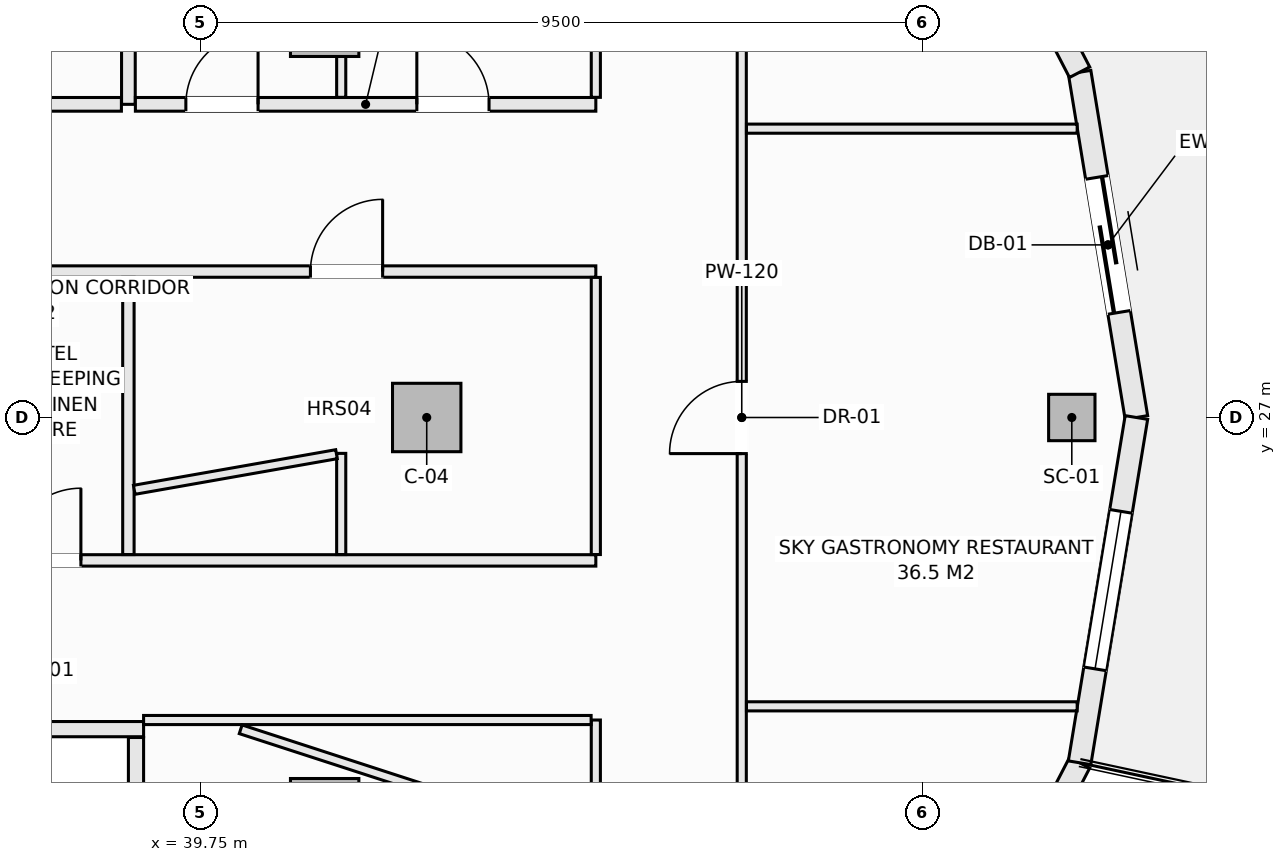
"""IFC4 building model, lengths in metres.
Left out: names, types, materials, properties, quantities, classifications, styles, units other than length and angle.
Written with IfcOpenShell. Run it as: python <this file> out.ifc"""

import sys

from ifc_helpers import new_model, si_unit, direction, frame, frame_2d, origin, origin_2d, place, context, subcontext, project, spatial, rectangle, hollow_rectangle, extrude, element, fill, save


model = new_model("IFC4")
c1 = context("Model", 3, precision=1e-05, world=origin(), true_north=direction((0.0, 1.0)))
c2 = subcontext(c1, "Body", "Model", "MODEL_VIEW")
j1 = project(units=[si_unit("LENGTHUNIT", "METRE"), si_unit("PLANEANGLEUNIT", "RADIAN")], contexts=[c1])
p1 = place(None, origin())
s1 = spatial("IfcSite", under=j1, at=p1, CompositionType="ELEMENT")
p2 = place(p1, origin())
s2 = spatial("IfcBuilding", under=s1, at=p2, CompositionType="ELEMENT")
p3 = place(p2, frame((0.0, 0.0, 183.5)))
s3 = spatial("IfcBuildingStorey", under=s2, at=p3, CompositionType="ELEMENT", Elevation=183.5)
p4 = place(p3, frame((51.212, 27.0, -0.27), z_axis=(0.0, 0.0, 1.0), x_axis=(1.0, 0.0, 0.0)))
e1 = element("IfcColumn", 1, at=p4, inside=s3, PredefinedType="COLUMN", context=c2, shape_type="SweptSolid", body=[
    extrude(hollow_rectangle(XDim=0.61, YDim=0.61, WallThickness=0.025, at=origin_2d()), origin(), (0.0, 0.0, 1.0), 3.35),
])
for number, where, z_axis, x_axis in (
    (2, (42.725, 27.0, -0.27), (0.0, 0.0, 1.0), (1.0, 0.0, 0.0)),
    (3, (41.382, 32.199, -0.27), (0.0, 0.0, 1.0), (1.0, 0.0, 0.0)),
    (4, (41.382, 21.801, -0.27), (0.0, 0.0, 1.0), (1.0, 0.0, 0.0)),
):
    element("IfcColumn", number, at=place(p3, frame(where, z_axis=z_axis, x_axis=x_axis)), inside=s3, PredefinedType="COLUMN", context=c2, shape_type="SweptSolid", body=[
        extrude(rectangle(XDim=0.9, YDim=0.9, at=origin_2d()), origin(), (0.0, 0.0, 1.0), 3.35),
    ])
p5 = place(p3, frame((51.315, 31.542, 0.0), z_axis=(0.0, 0.0, 1.0), x_axis=(0.162394765401, -0.986725868806, 0.0)))
e5 = element("IfcWall", 5, at=p5, inside=s3, PredefinedType="SOLIDWALL", context=c2, shape_type="SweptSolid", body=[
    extrude(rectangle(XDim=4.603, YDim=0.3, at=frame_2d((2.302, 0.0))), origin(), (0.0, 0.0, 1.0), 2.603),
])
p6 = place(p5, frame((1.402, 0.0, 0.0)))
e6 = element("IfcOpeningElement", 6, at=p6, cuts=e5, PredefinedType="OPENING", context=c2, shape_type="SweptSolid", body=[
    extrude(rectangle(XDim=1.8, YDim=2.25, at=frame_2d((0.9, 1.125))), frame((0.0, 0.16, 0.0), z_axis=(0.0, -1.0, 0.0), x_axis=(1.0, 0.0, 0.0)), (0.0, 0.0, 1.0), 0.32),
])
p7 = place(p3, frame((49.123, 35.775, 0.0), z_axis=(0.0, 0.0, 1.0), x_axis=(0.459810251451, -0.888017191647, 0.0)))
e7 = element("IfcWall", 7, at=p7, inside=s3, PredefinedType="SOLIDWALL", context=c2, shape_type="SweptSolid", body=[
    extrude(rectangle(XDim=4.766, YDim=0.3, at=frame_2d((2.383, 0.0))), origin(), (0.0, 0.0, 1.0), 2.603),
])
p8 = place(p7, frame((1.333, 0.0, 0.74)))
e8 = element("IfcOpeningElement", 8, at=p8, cuts=e7, PredefinedType="OPENING", context=c2, shape_type="SweptSolid", body=[
    extrude(rectangle(XDim=2.1, YDim=1.7, at=frame_2d((1.05, 0.85))), frame((0.0, 0.16, 0.0), z_axis=(0.0, -1.0, 0.0), x_axis=(1.0, 0.0, 0.0)), (0.0, 0.0, 1.0), 0.32),
])
p9 = place(p3, frame((49.123, 18.225, 0.0), z_axis=(0.0, 0.0, 1.0), x_axis=(0.459810251451, 0.888017191647, 0.0)))
e9 = element("IfcWall", 9, at=p9, inside=s3, PredefinedType="SOLIDWALL", context=c2, shape_type="SweptSolid", body=[
    extrude(rectangle(XDim=4.766, YDim=0.3, at=frame_2d((2.383, 0.0))), origin(), (0.0, 0.0, 1.0), 2.603),
])
p10 = place(p9, frame((1.333, 0.0, 0.74)))
e10 = element("IfcOpeningElement", 10, at=p10, cuts=e9, PredefinedType="OPENING", context=c2, shape_type="SweptSolid", body=[
    extrude(rectangle(XDim=2.1, YDim=1.7, at=frame_2d((1.05, 0.85))), frame((0.0, 0.16, 0.0), z_axis=(0.0, -1.0, 0.0), x_axis=(1.0, 0.0, 0.0)), (0.0, 0.0, 1.0), 0.32),
])
p11 = place(p3, frame((51.315, 22.458, 0.0), z_axis=(0.0, 0.0, 1.0), x_axis=(0.162394765401, 0.986725868806, 0.0)))
e11 = element("IfcWall", 11, at=p11, inside=s3, PredefinedType="SOLIDWALL", context=c2, shape_type="SweptSolid", body=[
    extrude(rectangle(XDim=4.603, YDim=0.3, at=frame_2d((2.302, 0.0))), origin(), (0.0, 0.0, 1.0), 2.603),
])
p12 = place(p11, frame((1.252, 0.0, 0.74)))
e12 = element("IfcOpeningElement", 12, at=p12, cuts=e11, PredefinedType="OPENING", context=c2, shape_type="SweptSolid", body=[
    extrude(rectangle(XDim=2.1, YDim=1.7, at=frame_2d((1.05, 0.85))), frame((0.0, 0.16, 0.0), z_axis=(0.0, -1.0, 0.0), x_axis=(1.0, 0.0, 0.0)), (0.0, 0.0, 1.0), 0.32),
])
p13 = place(p3, frame((36.75, 22.9, 0.0), z_axis=(0.0, 0.0, 1.0), x_axis=(1.0, 0.0, 0.0)))
e13 = element("IfcWall", 13, at=p13, inside=s3, PredefinedType="SOLIDWALL", context=c2, shape_type="SweptSolid", body=[
    extrude(rectangle(XDim=2.25, YDim=0.2, at=frame_2d((1.125, 0.0))), origin(), (0.0, 0.0, 1.0), 3.08),
])
p14 = place(p3, frame((38.9, 20.36, 0.0), z_axis=(0.0, 0.0, 1.0), x_axis=(0.0, 1.0, 0.0)))
e14 = element("IfcWall", 14, at=p14, inside=s3, PredefinedType="SOLIDWALL", context=c2, shape_type="SweptSolid", body=[
    extrude(rectangle(XDim=2.43, YDim=0.2, at=frame_2d((1.215, 0.0))), origin(), (0.0, 0.0, 1.0), 3.08),
])
p15 = place(p3, frame((29.78, 25.12, 0.0), z_axis=(0.0, 0.0, 1.0), x_axis=(1.0, 0.0, 0.0)))
e15 = element("IfcWall", 15, at=p15, inside=s3, PredefinedType="PARTITIONING", context=c2, shape_type="SweptSolid", body=[
    extrude(rectangle(XDim=15.17, YDim=0.15, at=frame_2d((7.585, 0.0))), origin(), (0.0, 0.0, 1.0), 3.08),
])
p16 = place(p15, frame((3.14, 0.0, 0.0)))
e16 = element("IfcOpeningElement", 16, at=p16, cuts=e15, PredefinedType="OPENING", context=c2, shape_type="SweptSolid", body=[
    extrude(rectangle(XDim=0.95, YDim=2.1, at=frame_2d((0.475, 1.05))), frame((0.0, 0.085, 0.0), z_axis=(0.0, -1.0, 0.0), x_axis=(1.0, 0.0, 0.0)), (0.0, 0.0, 1.0), 0.17),
])
p17 = place(p15, frame((7.445, 0.0, 0.0)))
e17 = element("IfcOpeningElement", 17, at=p17, cuts=e15, PredefinedType="OPENING", context=c2, shape_type="SweptSolid", body=[
    extrude(rectangle(XDim=0.95, YDim=2.1, at=frame_2d((0.475, 1.05))), frame((0.0, 0.085, 0.0), z_axis=(0.0, -1.0, 0.0), x_axis=(1.0, 0.0, 0.0)), (0.0, 0.0, 1.0), 0.17),
])
p18 = place(p3, frame((30.077, 28.92, 0.0), z_axis=(0.0, 0.0, 1.0), x_axis=(1.0, 0.0, 0.0)))
e18 = element("IfcWall", 18, at=p18, inside=s3, PredefinedType="PARTITIONING", context=c2, shape_type="SweptSolid", body=[
    extrude(rectangle(XDim=14.873, YDim=0.15, at=frame_2d((7.437, 0.0))), origin(), (0.0, 0.0, 1.0), 3.08),
])
p19 = place(p18, frame((11.118, 0.0, 0.0)))
e19 = element("IfcOpeningElement", 19, at=p19, cuts=e18, PredefinedType="OPENING", context=c2, shape_type="SweptSolid", body=[
    extrude(rectangle(XDim=0.95, YDim=2.1, at=frame_2d((0.475, 1.05))), frame((0.0, 0.085, 0.0), z_axis=(0.0, -1.0, 0.0), x_axis=(1.0, 0.0, 0.0)), (0.0, 0.0, 1.0), 0.17),
])
p20 = place(p3, frame((38.8, 25.197, 0.0), z_axis=(0.0, 0.0, 1.0), x_axis=(0.0, 1.0, 0.0)))
e20 = element("IfcWall", 20, at=p20, inside=s3, PredefinedType="PARTITIONING", context=c2, shape_type="SweptSolid", body=[
    extrude(rectangle(XDim=3.646, YDim=0.15, at=frame_2d((1.823, 0.0))), origin(), (0.0, 0.0, 1.0), 3.08),
])
p21 = place(p3, frame((38.8, 31.12, 0.0), z_axis=(0.0, 0.0, 1.0), x_axis=(0.0, 1.0, 0.0)))
e21 = element("IfcWall", 21, at=p21, inside=s3, PredefinedType="SOLIDWALL", context=c2, shape_type="SweptSolid", body=[
    extrude(rectangle(XDim=2.63, YDim=0.18, at=frame_2d((1.315, 0.0))), origin(), (0.0, 0.0, 1.0), 3.08),
])
p22 = place(p3, frame((30.077, 31.12, 0.0), z_axis=(0.0, 0.0, 1.0), x_axis=(1.0, 0.0, 0.0)))
e22 = element("IfcWall", 22, at=p22, inside=s3, PredefinedType="SOLIDWALL", context=c2, shape_type="SweptSolid", body=[
    extrude(rectangle(XDim=8.631, YDim=0.18, at=frame_2d((4.315, 0.0))), origin(), (0.0, 0.0, 1.0), 3.08),
])
p23 = place(p22, frame((2.592, 0.0, 0.0)))
e23 = element("IfcOpeningElement", 23, at=p23, cuts=e22, PredefinedType="OPENING", context=c2, shape_type="SweptSolid", body=[
    extrude(rectangle(XDim=0.95, YDim=2.1, at=frame_2d((0.475, 1.05))), frame((0.0, 0.1, 0.0), z_axis=(0.0, -1.0, 0.0), x_axis=(1.0, 0.0, 0.0)), (0.0, 0.0, 1.0), 0.2),
])
p24 = place(p22, frame((6.497, 0.0, 0.0)))
e24 = element("IfcOpeningElement", 24, at=p24, cuts=e22, PredefinedType="OPENING", context=c2, shape_type="SweptSolid", body=[
    extrude(rectangle(XDim=0.95, YDim=2.1, at=frame_2d((0.475, 1.05))), frame((0.0, 0.1, 0.0), z_axis=(0.0, -1.0, 0.0), x_axis=(1.0, 0.0, 0.0)), (0.0, 0.0, 1.0), 0.2),
])
p25 = place(p3, frame((38.892, 31.12, 0.0), z_axis=(0.0, 0.0, 1.0), x_axis=(1.0, 0.0, 0.0)))
e25 = element("IfcWall", 25, at=p25, inside=s3, PredefinedType="SOLIDWALL", context=c2, shape_type="SweptSolid", body=[
    extrude(rectangle(XDim=6.058, YDim=0.18, at=frame_2d((3.029, 0.0))), origin(), (0.0, 0.0, 1.0), 3.08),
])
p26 = place(p25, frame((3.703, 0.0, 0.0)))
e26 = element("IfcOpeningElement", 26, at=p26, cuts=e25, PredefinedType="OPENING", context=c2, shape_type="SweptSolid", body=[
    extrude(rectangle(XDim=0.95, YDim=2.1, at=frame_2d((0.475, 1.05))), frame((0.0, 0.1, 0.0), z_axis=(0.0, -1.0, 0.0), x_axis=(1.0, 0.0, 0.0)), (0.0, 0.0, 1.0), 0.2),
])
p27 = place(p25, frame((0.664, 0.0, 0.0)))
e27 = element("IfcOpeningElement", 27, at=p27, cuts=e25, PredefinedType="OPENING", context=c2, shape_type="SweptSolid", body=[
    extrude(rectangle(XDim=0.95, YDim=2.1, at=frame_2d((0.475, 1.05))), frame((0.0, 0.1, 0.0), z_axis=(0.0, -1.0, 0.0), x_axis=(1.0, 0.0, 0.0)), (0.0, 0.0, 1.0), 0.2),
])
p28 = place(p3, frame((44.95, 20.192, 0.0), z_axis=(0.0, 0.0, 1.0), x_axis=(0.0, 1.0, 0.0)))
e28 = element("IfcWall", 28, at=p28, inside=s3, PredefinedType="PARTITIONING", context=c2, shape_type="SweptSolid", body=[
    extrude(rectangle(XDim=2.828, YDim=0.12, at=frame_2d((1.414, 0.0))), origin(), (0.0, 0.0, 1.0), 3.08),
])
p29 = place(p3, frame((44.95, 25.197, 0.0), z_axis=(0.0, 0.0, 1.0), x_axis=(0.0, 1.0, 0.0)))
e29 = element("IfcWall", 29, at=p29, inside=s3, PredefinedType="PARTITIONING", context=c2, shape_type="SweptSolid", body=[
    extrude(rectangle(XDim=3.646, YDim=0.12, at=frame_2d((1.823, 0.0))), origin(), (0.0, 0.0, 1.0), 3.08),
])
p30 = place(p3, frame((44.95, 31.212, 0.0), z_axis=(0.0, 0.0, 1.0), x_axis=(0.0, 1.0, 0.0)))
e30 = element("IfcWall", 30, at=p30, inside=s3, PredefinedType="PARTITIONING", context=c2, shape_type="SweptSolid", body=[
    extrude(rectangle(XDim=2.596, YDim=0.12, at=frame_2d((1.298, 0.0))), origin(), (0.0, 0.0, 1.0), 3.08),
])
p31 = place(p3, frame((46.87, 21.659, 0.0), z_axis=(0.0, 0.0, 1.0), x_axis=(0.0, 1.0, 0.0)))
e31 = element("IfcWall", 31, at=p31, inside=s3, PredefinedType="PARTITIONING", context=c2, shape_type="SweptSolid", body=[
    extrude(rectangle(XDim=10.682, YDim=0.12, at=frame_2d((5.341, 0.0))), origin(), (0.0, 0.0, 1.0), 3.08),
])
p32 = place(p31, frame((4.866, 0.0, 0.0)))
e32 = element("IfcOpeningElement", 32, at=p32, cuts=e31, PredefinedType="OPENING", context=c2, shape_type="SweptSolid", body=[
    extrude(rectangle(XDim=0.95, YDim=2.1, at=frame_2d((0.475, 1.05))), frame((0.0, 0.07, 0.0), z_axis=(0.0, -1.0, 0.0), x_axis=(1.0, 0.0, 0.0)), (0.0, 0.0, 1.0), 0.14),
])
p33 = place(p3, frame((39.0, 23.02, 0.0), z_axis=(0.0, 0.0, 1.0), x_axis=(1.0, 0.0, 0.0)))
e33 = element("IfcWall", 33, at=p33, inside=s3, PredefinedType="PARTITIONING", context=c2, shape_type="SweptSolid", body=[
    extrude(rectangle(XDim=5.888, YDim=0.12, at=frame_2d((2.944, 0.0))), origin(), (0.0, 0.0, 1.0), 3.08),
])
p34 = place(p3, frame((40.278, 22.898, 0.0), z_axis=(0.0, 0.0, 1.0), x_axis=(0.951068113263, -0.3089813003, 0.0)))
e34 = element("IfcWall", 34, at=p34, inside=s3, PredefinedType="PARTITIONING", context=c2, shape_type="SweptSolid", body=[
    extrude(rectangle(XDim=4.848, YDim=0.12, at=frame_2d((2.424, 0.0))), origin(), (0.0, 0.0, 1.0), 3.08),
])
p35 = place(p3, frame((46.932, 23.2, 0.0), z_axis=(0.0, 0.0, 1.0), x_axis=(1.0, 0.0, 0.0)))
e35 = element("IfcWall", 35, at=p35, inside=s3, PredefinedType="PARTITIONING", context=c2, shape_type="SweptSolid", body=[
    extrude(rectangle(XDim=4.351, YDim=0.12, at=frame_2d((2.176, 0.0))), origin(), (0.0, 0.0, 1.0), 2.762),
])
p36 = place(p3, frame((46.932, 30.8, 0.0), z_axis=(0.0, 0.0, 1.0), x_axis=(1.0, 0.0, 0.0)))
e36 = element("IfcWall", 36, at=p36, inside=s3, PredefinedType="PARTITIONING", context=c2, shape_type="SweptSolid", body=[
    extrude(rectangle(XDim=4.351, YDim=0.12, at=frame_2d((2.176, 0.0))), origin(), (0.0, 0.0, 1.0), 3.08),
])
p37 = place(p3, frame((41.6, 25.197, 0.0), z_axis=(0.0, 0.0, 1.0), x_axis=(0.0, 1.0, 0.0)))
e37 = element("IfcWall", 37, at=p37, inside=s3, PredefinedType="PARTITIONING", context=c2, shape_type="SweptSolid", body=[
    extrude(rectangle(XDim=1.331, YDim=0.12, at=frame_2d((0.666, 0.0))), origin(), (0.0, 0.0, 1.0), 3.08),
])
p38 = place(p3, frame((41.6, 31.212, 0.0), z_axis=(0.0, 0.0, 1.0), x_axis=(0.0, 1.0, 0.0)))
e38 = element("IfcWall", 38, at=p38, inside=s3, PredefinedType="PARTITIONING", context=c2, shape_type="SweptSolid", body=[
    extrude(rectangle(XDim=10.238, YDim=0.12, at=frame_2d((5.119, 0.0))), origin(), (0.0, 0.0, 1.0), 2.455),
])
p39 = place(p3, frame((38.877, 26.049, 0.0), z_axis=(0.0, 0.0, 1.0), x_axis=(0.984853517989, 0.173388431286, 0.0)))
e39 = element("IfcWall", 39, at=p39, inside=s3, PredefinedType="PARTITIONING", context=c2, shape_type="SweptSolid", body=[
    extrude(rectangle(XDim=2.702, YDim=0.12, at=frame_2d((1.351, 0.0))), origin(), (0.0, 0.0, 1.0), 3.08),
])
p40 = place(p6, origin())
e40 = element("IfcDoor", 40, at=p40, inside=s3, OperationType="SLIDING_TO_LEFT", PredefinedType="DOOR", context=c2, shape_type="SweptSolid", body=[
    extrude(rectangle(XDim=1.8, YDim=2.25, at=frame_2d((0.9, 1.125))), frame((0.0, 0.025, 0.0), z_axis=(0.0, -1.0, 0.0), x_axis=(1.0, 0.0, 0.0)), (0.0, 0.0, 1.0), 0.05),
])
fill(e6, e40)
p41 = place(p12, origin())
e41 = element("IfcWindow", 41, at=p41, inside=s3, PartitioningType="SINGLE_PANEL", PredefinedType="WINDOW", context=c2, shape_type="SweptSolid", body=[
    extrude(rectangle(XDim=2.1, YDim=1.7, at=frame_2d((1.05, 0.85))), frame((0.0, 0.03, 0.0), z_axis=(0.0, -1.0, 0.0), x_axis=(1.0, 0.0, 0.0)), (0.0, 0.0, 1.0), 0.06),
])
fill(e12, e41)
p42 = place(p17, origin())
e42 = element("IfcDoor", 42, at=p42, inside=s3, OperationType="SINGLE_SWING_RIGHT", PredefinedType="DOOR", context=c2, shape_type="SweptSolid", body=[
    extrude(rectangle(XDim=0.95, YDim=2.1, at=frame_2d((0.475, 1.05))), frame((0.0, 0.025, 0.0), z_axis=(0.0, -1.0, 0.0), x_axis=(1.0, 0.0, 0.0)), (0.0, 0.0, 1.0), 0.05),
])
fill(e17, e42)
p43 = place(p32, origin())
e43 = element("IfcDoor", 43, at=p43, inside=s3, OperationType="SINGLE_SWING_LEFT", PredefinedType="DOOR", context=c2, shape_type="SweptSolid", body=[
    extrude(rectangle(XDim=0.95, YDim=2.1, at=frame_2d((0.475, 1.05))), frame((0.0, 0.025, 0.0), z_axis=(0.0, -1.0, 0.0), x_axis=(1.0, 0.0, 0.0)), (0.0, 0.0, 1.0), 0.05),
])
fill(e32, e43)
p44 = place(p19, origin())
e44 = element("IfcDoor", 44, at=p44, inside=s3, OperationType="SINGLE_SWING_RIGHT", PredefinedType="DOOR", context=c2, shape_type="SweptSolid", body=[
    extrude(rectangle(XDim=0.95, YDim=2.1, at=frame_2d((0.475, 1.05))), frame((0.0, 0.025, 0.0), z_axis=(0.0, -1.0, 0.0), x_axis=(1.0, 0.0, 0.0)), (0.0, 0.0, 1.0), 0.05),
])
fill(e19, e44)
p45 = place(p26, origin())
e45 = element("IfcDoor", 45, at=p45, inside=s3, OperationType="SINGLE_SWING_LEFT", PredefinedType="DOOR", context=c2, shape_type="SweptSolid", body=[
    extrude(rectangle(XDim=0.95, YDim=2.1, at=frame_2d((0.475, 1.05))), frame((0.0, 0.025, 0.0), z_axis=(0.0, -1.0, 0.0), x_axis=(1.0, 0.0, 0.0)), (0.0, 0.0, 1.0), 0.05),
])
fill(e26, e45)
p46 = place(p27, origin())
e46 = element("IfcDoor", 46, at=p46, inside=s3, OperationType="SINGLE_SWING_RIGHT", PredefinedType="DOOR", context=c2, shape_type="SweptSolid", body=[
    extrude(rectangle(XDim=0.95, YDim=2.1, at=frame_2d((0.475, 1.05))), frame((0.0, 0.025, 0.0), z_axis=(0.0, -1.0, 0.0), x_axis=(1.0, 0.0, 0.0)), (0.0, 0.0, 1.0), 0.05),
])
fill(e27, e46)
save(model, sys.argv[1])
